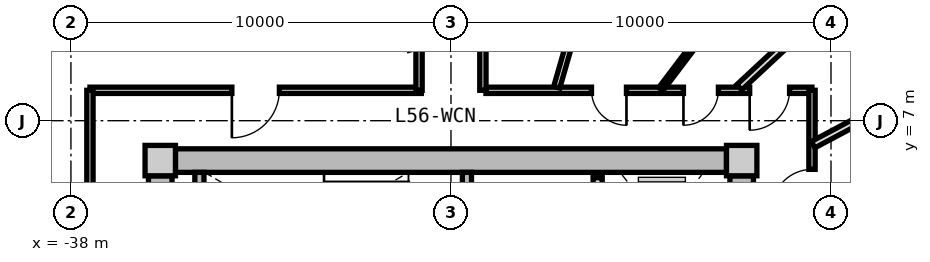
"""IFC4 building model, lengths in metres.
Left out: names, types, materials, properties, quantities, classifications, styles, units other than length and angle.
Written with IfcOpenShell. Run it as: python <this file> out.ifc"""

import sys

from ifc_helpers import new_model, si_unit, direction, frame, frame_2d, origin, origin_2d, place, context, subcontext, project, spatial, rectangle, extrude, source, transform, mapped, element, fill, save


model = new_model("IFC4")
c1 = context("Model", 3, precision=1e-05, world=origin(), true_north=direction((0.0, 1.0)))
c2 = subcontext(c1, "Body", "Model", "MODEL_VIEW")
j1 = project(units=[si_unit("LENGTHUNIT", "METRE"), si_unit("PLANEANGLEUNIT", "RADIAN")], contexts=[c1])
p1 = place(None, origin())
s1 = spatial("IfcSite", under=j1, at=p1, CompositionType="ELEMENT")
p2 = place(p1, origin())
s2 = spatial("IfcBuilding", under=s1, at=p2, CompositionType="ELEMENT")
p3 = place(p2, frame((0.0, 0.0, 180.05)))
s3 = spatial("IfcBuildingStorey", under=s2, at=p3, CompositionType="ELEMENT", Elevation=180.05)
m1 = source(origin(), c2, "Body", "SweptSolid", [
    extrude(rectangle(XDim=0.8, YDim=0.8, at=origin_2d()), origin(), (0.0, 0.0, 1.0), 3.05),
])
for number, where, z_axis, x_axis in (
    (1, (-20.35, 5.95, 0.0), (0.0, 0.0, 1.0), (1.0, 0.0, 0.0)),
    (2, (-35.65, 5.95, 0.0), (0.0, 0.0, 1.0), (1.0, 0.0, 0.0)),
):
    element("IfcColumn", number, at=place(p3, frame(where, z_axis=z_axis, x_axis=x_axis)), inside=s3, PredefinedType="COLUMN", context=c2, shape_type="MappedRepresentation", body=[
        mapped(m1, transform((0.0, 0.0, 0.0), x_axis=(1.0, 0.0, 0.0), y_axis=(0.0, 1.0, 0.0), z_axis=(0.0, 0.0, 1.0), scale=1.0)),
    ])
m2 = source(origin(), c2, "Body", "SweptSolid", [
    extrude(rectangle(XDim=14.5, YDim=0.62, at=frame_2d((7.25, 0.0))), origin(), (0.0, 0.0, 1.0), 2.81),
])
p4 = place(p3, frame((-35.25, 5.95, 0.0), z_axis=(0.0, 0.0, 1.0), x_axis=(1.0, 0.0, 0.0)))
e3 = element("IfcWall", 3, at=p4, inside=s3, PredefinedType="SHEAR", context=c2, shape_type="MappedRepresentation", body=[
    mapped(m2, transform((0.0, 0.0, 0.0), x_axis=(1.0, 0.0, 0.0), y_axis=(0.0, 1.0, 0.0), z_axis=(0.0, 0.0, 1.0), scale=1.0)),
])
m3 = source(origin(), c2, "Body", "SweptSolid", [
    extrude(rectangle(XDim=11.1, YDim=0.62, at=frame_2d((5.55, 0.0))), origin(), (0.0, 0.0, 1.0), 2.81),
])
p5 = place(p3, frame((-35.65, -5.55, 0.0), z_axis=(0.0, 0.0, 1.0), x_axis=(0.0, 1.0, 0.0)))
e4 = element("IfcWall", 4, at=p5, inside=s3, PredefinedType="SHEAR", context=c2, shape_type="MappedRepresentation", body=[
    mapped(m3, transform((0.0, 0.0, 0.0), x_axis=(1.0, 0.0, 0.0), y_axis=(0.0, 1.0, 0.0), z_axis=(0.0, 0.0, 1.0), scale=1.0)),
])
p6 = place(p5, frame((3.8, 0.0, 0.0)))
e5 = element("IfcOpeningElement", 5, at=p6, cuts=e4, PredefinedType="OPENING", context=c2, shape_type="SweptSolid", body=[
    extrude(rectangle(XDim=1.2, YDim=2.15, at=frame_2d((0.6, 1.075))), frame((0.0, 0.32, 0.0), z_axis=(0.0, -1.0, 0.0), x_axis=(1.0, 0.0, 0.0)), (0.0, 0.0, 1.0), 0.64),
])
p7 = place(p3, frame((-20.35, 5.55, 0.0), z_axis=(0.0, 0.0, 1.0), x_axis=(0.0, -1.0, 0.0)))
e6 = element("IfcWall", 6, at=p7, inside=s3, PredefinedType="SHEAR", context=c2, shape_type="MappedRepresentation", body=[
    mapped(m3, transform((0.0, 0.0, 0.0), x_axis=(1.0, 0.0, 0.0), y_axis=(0.0, 1.0, 0.0), z_axis=(0.0, 0.0, 1.0), scale=1.0)),
])
p8 = place(p7, frame((5.65, 0.0, 0.0)))
e7 = element("IfcOpeningElement", 7, at=p8, cuts=e6, PredefinedType="OPENING", context=c2, shape_type="SweptSolid", body=[
    extrude(rectangle(XDim=1.2, YDim=2.15, at=frame_2d((0.6, 1.075))), frame((0.0, 0.32, 0.0), z_axis=(0.0, -1.0, 0.0), x_axis=(1.0, 0.0, 0.0)), (0.0, 0.0, 1.0), 0.64),
])
m4 = source(origin(), c2, "Body", "SweptSolid", [
    extrude(rectangle(XDim=3.19, YDim=0.24, at=frame_2d((1.595, 0.0))), origin(), (0.0, 0.0, 1.0), 2.81),
])
p9 = place(p3, frame((-34.62, 2.45, 0.0), z_axis=(0.0, 0.0, 1.0), x_axis=(0.0, 1.0, 0.0)))
e8 = element("IfcWall", 8, at=p9, inside=s3, PredefinedType="PARTITIONING", context=c2, shape_type="MappedRepresentation", body=[
    mapped(m4, transform((0.0, 0.0, 0.0), x_axis=(1.0, 0.0, 0.0), y_axis=(0.0, 1.0, 0.0), z_axis=(0.0, 0.0, 1.0), scale=1.0)),
])
p10 = place(p3, frame((-27.58, 2.45, 0.0), z_axis=(0.0, 0.0, 1.0), x_axis=(0.0, 1.0, 0.0)))
e9 = element("IfcWall", 9, at=p10, inside=s3, PredefinedType="PARTITIONING", context=c2, shape_type="MappedRepresentation", body=[
    mapped(m4, transform((0.0, 0.0, 0.0), x_axis=(1.0, 0.0, 0.0), y_axis=(0.0, 1.0, 0.0), z_axis=(0.0, 0.0, 1.0), scale=1.0)),
])
p11 = place(p10, frame((0.55, 0.0, 0.0)))
e10 = element("IfcOpeningElement", 10, at=p11, cuts=e9, PredefinedType="OPENING", context=c2, shape_type="SweptSolid", body=[
    extrude(rectangle(XDim=1.1, YDim=2.15, at=frame_2d((0.55, 1.075))), frame((0.0, 0.13, 0.0), z_axis=(0.0, -1.0, 0.0), x_axis=(1.0, 0.0, 0.0)), (0.0, 0.0, 1.0), 0.26),
])
m5 = source(origin(), c2, "Body", "SweptSolid", [
    extrude(rectangle(XDim=5.0, YDim=0.24, at=frame_2d((2.5, 0.0))), origin(), (0.0, 0.0, 1.0), 2.795),
])
p12 = place(p3, frame((-24.14, 0.5, 0.0), z_axis=(0.0, 0.0, 1.0), x_axis=(0.0, 1.0, 0.0)))
e11 = element("IfcWall", 11, at=p12, inside=s3, PredefinedType="PARTITIONING", context=c2, shape_type="MappedRepresentation", body=[
    mapped(m5, transform((0.0, 0.0, 0.0), x_axis=(1.0, 0.0, 0.0), y_axis=(0.0, 1.0, 0.0), z_axis=(0.0, 0.0, 1.0), scale=1.0)),
])
p13 = place(p12, frame((3.05, 0.0, 0.0)))
e12 = element("IfcOpeningElement", 12, at=p13, cuts=e11, PredefinedType="OPENING", context=c2, shape_type="SweptSolid", body=[
    extrude(rectangle(XDim=1.3, YDim=2.2, at=frame_2d((0.65, 1.1))), frame((0.0, 0.13, 0.0), z_axis=(0.0, -1.0, 0.0), x_axis=(1.0, 0.0, 0.0)), (0.0, 0.0, 1.0), 0.26),
])
p14 = place(p12, frame((0.55, 0.0, 0.0)))
e13 = element("IfcOpeningElement", 13, at=p14, cuts=e11, PredefinedType="OPENING", context=c2, shape_type="SweptSolid", body=[
    extrude(rectangle(XDim=1.3, YDim=2.2, at=frame_2d((0.65, 1.1))), frame((0.0, 0.13, 0.0), z_axis=(0.0, -1.0, 0.0), x_axis=(1.0, 0.0, 0.0)), (0.0, 0.0, 1.0), 0.26),
])
m6 = source(origin(), c2, "Body", "SweptSolid", [
    extrude(rectangle(XDim=8.719, YDim=0.165, at=frame_2d((4.36, 0.0))), origin(), (0.0, 0.0, 1.0), 2.795),
])
p15 = place(p3, frame((-37.5, 7.8, 0.0), z_axis=(0.0, 0.0, 1.0), x_axis=(1.0, 0.0, 0.0)))
e14 = element("IfcWall", 14, at=p15, inside=s3, PredefinedType="PARTITIONING", context=c2, shape_type="MappedRepresentation", body=[
    mapped(m6, transform((0.0, 0.0, 0.0), x_axis=(1.0, 0.0, 0.0), y_axis=(0.0, 1.0, 0.0), z_axis=(0.0, 0.0, 1.0), scale=1.0)),
])
p16 = place(p15, frame((3.735, 0.0, 0.0)))
e15 = element("IfcOpeningElement", 15, at=p16, cuts=e14, PredefinedType="OPENING", context=c2, shape_type="SweptSolid", body=[
    extrude(rectangle(XDim=1.25, YDim=2.2, at=frame_2d((0.625, 1.1))), frame((0.0, 0.093, 0.0), z_axis=(0.0, -1.0, 0.0), x_axis=(1.0, 0.0, 0.0)), (0.0, 0.0, 1.0), 0.185),
])
m7 = source(origin(), c2, "Body", "SweptSolid", [
    extrude(rectangle(XDim=8.58, YDim=0.165, at=frame_2d((4.29, 0.0))), origin(), (0.0, 0.0, 1.0), 2.795),
])
p17 = place(p3, frame((-27.08, 7.8, 0.0), z_axis=(0.0, 0.0, 1.0), x_axis=(1.0, 0.0, 0.0)))
e16 = element("IfcWall", 16, at=p17, inside=s3, PredefinedType="PARTITIONING", context=c2, shape_type="MappedRepresentation", body=[
    mapped(m7, transform((0.0, 0.0, 0.0), x_axis=(1.0, 0.0, 0.0), y_axis=(0.0, 1.0, 0.0), z_axis=(0.0, 0.0, 1.0), scale=1.0)),
])
p18 = place(p17, frame((6.94, 0.0, 0.0)))
e17 = element("IfcOpeningElement", 17, at=p18, cuts=e16, PredefinedType="OPENING", context=c2, shape_type="SweptSolid", body=[
    extrude(rectangle(XDim=1.05, YDim=2.15, at=frame_2d((0.525, 1.075))), frame((0.0, 0.093, 0.0), z_axis=(0.0, -1.0, 0.0), x_axis=(1.0, 0.0, 0.0)), (0.0, 0.0, 1.0), 0.185),
])
p19 = place(p17, frame((5.197, 0.0, 0.0)))
e18 = element("IfcOpeningElement", 18, at=p19, cuts=e16, PredefinedType="OPENING", context=c2, shape_type="SweptSolid", body=[
    extrude(rectangle(XDim=0.92, YDim=2.1, at=frame_2d((0.46, 1.05))), frame((0.0, 0.093, 0.0), z_axis=(0.0, -1.0, 0.0), x_axis=(1.0, 0.0, 0.0)), (0.0, 0.0, 1.0), 0.185),
])
p20 = place(p17, frame((2.778, 0.0, 0.0)))
e19 = element("IfcOpeningElement", 19, at=p20, cuts=e16, PredefinedType="OPENING", context=c2, shape_type="SweptSolid", body=[
    extrude(rectangle(XDim=0.92, YDim=2.1, at=frame_2d((0.46, 1.05))), frame((0.0, 0.093, 0.0), z_axis=(0.0, -1.0, 0.0), x_axis=(1.0, 0.0, 0.0)), (0.0, 0.0, 1.0), 0.185),
])
m8 = source(origin(), c2, "Body", "SweptSolid", [
    extrude(rectangle(XDim=6.88, YDim=0.165, at=frame_2d((3.44, 0.0))), origin(), (0.0, 0.0, 1.0), 2.795),
])
p21 = place(p3, frame((-37.5, 0.92, 0.0), z_axis=(0.0, 0.0, 1.0), x_axis=(0.0, 1.0, 0.0)))
e20 = element("IfcWall", 20, at=p21, inside=s3, PredefinedType="PARTITIONING", context=c2, shape_type="MappedRepresentation", body=[
    mapped(m8, transform((0.0, 0.0, 0.0), x_axis=(1.0, 0.0, 0.0), y_axis=(0.0, 1.0, 0.0), z_axis=(0.0, 0.0, 1.0), scale=1.0)),
])
p22 = place(p3, frame((-18.5, 7.8, 0.0), z_axis=(0.0, 0.0, 1.0), x_axis=(0.0, -1.0, 0.0)))
e21 = element("IfcWall", 21, at=p22, inside=s3, PredefinedType="PARTITIONING", context=c2, shape_type="MappedRepresentation", body=[
    mapped(m8, transform((0.0, 0.0, 0.0), x_axis=(1.0, 0.0, 0.0), y_axis=(0.0, 1.0, 0.0), z_axis=(0.0, 0.0, 1.0), scale=1.0)),
])
p23 = place(p22, frame((2.081, 0.0, 0.0)))
e22 = element("IfcOpeningElement", 22, at=p23, cuts=e21, PredefinedType="OPENING", context=c2, shape_type="SweptSolid", body=[
    extrude(rectangle(XDim=1.05, YDim=2.15, at=frame_2d((0.525, 1.075))), frame((0.0, 0.093, 0.0), z_axis=(0.0, -1.0, 0.0), x_axis=(1.0, 0.0, 0.0)), (0.0, 0.0, 1.0), 0.185),
])
m9 = source(origin(), c2, "Body", "SweptSolid", [
    extrude(rectangle(XDim=9.73, YDim=0.165, at=frame_2d((4.865, 0.0))), origin(), (0.0, 0.0, 1.0), 2.345),
])
p24 = place(p3, frame((-25.217, 7.88, 0.0), z_axis=(0.0, 0.0, 1.0), x_axis=(0.27679492614, 0.960929013436, 0.0)))
e23 = element("IfcWall", 23, at=p24, inside=s3, PredefinedType="PARTITIONING", context=c2, shape_type="MappedRepresentation", body=[
    mapped(m9, transform((0.0, 0.0, 0.0), x_axis=(1.0, 0.0, 0.0), y_axis=(0.0, 1.0, 0.0), z_axis=(0.0, 0.0, 1.0), scale=1.0)),
])
m10 = source(origin(), c2, "Body", "SweptSolid", [
    extrude(rectangle(XDim=6.193, YDim=0.165, at=frame_2d((3.096, 0.0))), origin(), (0.0, 0.0, 1.0), 2.345),
])
p25 = place(p3, frame((-37.58, 4.419, 0.0), z_axis=(0.0, 0.0, 1.0), x_axis=(-0.970309243466, 0.241867674657, 0.0)))
e24 = element("IfcWall", 24, at=p25, inside=s3, PredefinedType="PARTITIONING", context=c2, shape_type="MappedRepresentation", body=[
    mapped(m10, transform((0.0, 0.0, 0.0), x_axis=(1.0, 0.0, 0.0), y_axis=(0.0, 1.0, 0.0), z_axis=(0.0, 0.0, 1.0), scale=1.0)),
])
m11 = source(origin(), c2, "Body", "SweptSolid", [
    extrude(rectangle(XDim=8.305, YDim=0.165, at=frame_2d((4.153, 0.0))), origin(), (0.0, 0.0, 1.0), 2.345),
])
p26 = place(p3, frame((-18.42, 3.908, 0.0), z_axis=(0.0, 0.0, 1.0), x_axis=(0.970309994378, 0.241864662175, 0.0)))
e25 = element("IfcWall", 25, at=p26, inside=s3, PredefinedType="PARTITIONING", context=c2, shape_type="MappedRepresentation", body=[
    mapped(m11, transform((0.0, 0.0, 0.0), x_axis=(1.0, 0.0, 0.0), y_axis=(0.0, 1.0, 0.0), z_axis=(0.0, 0.0, 1.0), scale=1.0)),
])
m12 = source(origin(), c2, "Body", "SweptSolid", [
    extrude(rectangle(XDim=9.48, YDim=0.165, at=frame_2d((4.74, 0.0))), origin(), (0.0, 0.0, 1.0), 2.795),
])
p27 = place(p3, frame((-28.84, 7.8, 0.0), z_axis=(0.0, 0.0, 1.0), x_axis=(0.0, 1.0, 0.0)))
e26 = element("IfcWall", 26, at=p27, inside=s3, PredefinedType="PARTITIONING", context=c2, shape_type="MappedRepresentation", body=[
    mapped(m12, transform((0.0, 0.0, 0.0), x_axis=(1.0, 0.0, 0.0), y_axis=(0.0, 1.0, 0.0), z_axis=(0.0, 0.0, 1.0), scale=1.0)),
])
p28 = place(p27, frame((4.521, 0.0, 0.0)))
e27 = element("IfcOpeningElement", 27, at=p28, cuts=e26, PredefinedType="OPENING", context=c2, shape_type="SweptSolid", body=[
    extrude(rectangle(XDim=0.95, YDim=2.1, at=frame_2d((0.475, 1.05))), frame((0.0, 0.093, 0.0), z_axis=(0.0, -1.0, 0.0), x_axis=(1.0, 0.0, 0.0)), (0.0, 0.0, 1.0), 0.185),
])
p29 = place(p3, frame((-27.16, 17.28, 0.0), z_axis=(0.0, 0.0, 1.0), x_axis=(0.0, -1.0, 0.0)))
e28 = element("IfcWall", 28, at=p29, inside=s3, PredefinedType="PARTITIONING", context=c2, shape_type="MappedRepresentation", body=[
    mapped(m12, transform((0.0, 0.0, 0.0), x_axis=(1.0, 0.0, 0.0), y_axis=(0.0, 1.0, 0.0), z_axis=(0.0, 0.0, 1.0), scale=1.0)),
])
p30 = place(p29, frame((4.265, 0.0, 0.0)))
e29 = element("IfcOpeningElement", 29, at=p30, cuts=e28, PredefinedType="OPENING", context=c2, shape_type="SweptSolid", body=[
    extrude(rectangle(XDim=0.95, YDim=2.1, at=frame_2d((0.475, 1.05))), frame((0.0, 0.093, 0.0), z_axis=(0.0, -1.0, 0.0), x_axis=(1.0, 0.0, 0.0)), (0.0, 0.0, 1.0), 0.185),
])
m13 = source(origin(), c2, "Body", "SweptSolid", [
    extrude(rectangle(XDim=7.648, YDim=0.19, at=frame_2d((3.824, 0.0))), origin(), (0.0, 0.0, 1.0), 2.345),
])
p31 = place(p3, frame((-20.413, 7.88, 0.0), z_axis=(0.0, 0.0, 1.0), x_axis=(0.732182665826, 0.681108320213, 0.0)))
e30 = element("IfcWall", 30, at=p31, inside=s3, PredefinedType="PARTITIONING", context=c2, shape_type="MappedRepresentation", body=[
    mapped(m13, transform((0.0, 0.0, 0.0), x_axis=(1.0, 0.0, 0.0), y_axis=(0.0, 1.0, 0.0), z_axis=(0.0, 0.0, 1.0), scale=1.0)),
])
m14 = source(origin(), c2, "Body", "SweptSolid", [
    extrude(rectangle(XDim=6.665, YDim=0.19, at=frame_2d((3.333, 0.0))), origin(), (0.0, 0.0, 1.0), 2.795),
])
p32 = place(p3, frame((-18.47, 6.37, 0.0), z_axis=(0.0, 0.0, 1.0), x_axis=(0.88263769619, 0.470053930166, 0.0)))
e31 = element("IfcWall", 31, at=p32, inside=s3, PredefinedType="PARTITIONING", context=c2, shape_type="MappedRepresentation", body=[
    mapped(m14, transform((0.0, 0.0, 0.0), x_axis=(1.0, 0.0, 0.0), y_axis=(0.0, 1.0, 0.0), z_axis=(0.0, 0.0, 1.0), scale=1.0)),
])
m15 = source(origin(), c2, "Body", "SweptSolid", [
    extrude(rectangle(XDim=8.359, YDim=0.14, at=frame_2d((4.18, 0.0))), origin(), (0.0, 0.0, 1.0), 2.795),
])
p33 = place(p3, frame((-22.477, 7.83, 0.0), z_axis=(0.0, 0.0, 1.0), x_axis=(0.603265985309, 0.797540062297, 0.0)))
e32 = element("IfcWall", 32, at=p33, inside=s3, PredefinedType="PARTITIONING", context=c2, shape_type="MappedRepresentation", body=[
    mapped(m15, transform((0.0, 0.0, 0.0), x_axis=(1.0, 0.0, 0.0), y_axis=(0.0, 1.0, 0.0), z_axis=(0.0, 0.0, 1.0), scale=1.0)),
])
m16 = source(origin(), c2, "Body", "SweptSolid", [
    extrude(rectangle(XDim=1.05, YDim=2.15, at=frame_2d((0.525, 1.075))), frame((0.0, 0.025, 0.0), z_axis=(0.0, -1.0, 0.0), x_axis=(1.0, 0.0, 0.0)), (0.0, 0.0, 1.0), 0.05),
])
p34 = place(p23, frame((1.05, 0.0, 0.0), z_axis=(0.0, 0.0, 1.0), x_axis=(-1.0, 0.0, 0.0)))
e33 = element("IfcDoor", 33, at=p34, inside=s3, OperationType="SINGLE_SWING_LEFT", PredefinedType="DOOR", context=c2, shape_type="MappedRepresentation", body=[
    mapped(m16, transform((0.0, 0.0, 0.0), x_axis=(1.0, 0.0, 0.0), y_axis=(0.0, 1.0, 0.0), z_axis=(0.0, 0.0, 1.0), scale=1.0)),
])
fill(e22, e33)
p35 = place(p18, frame((1.05, 0.0, 0.0), z_axis=(0.0, 0.0, 1.0), x_axis=(-1.0, 0.0, 0.0)))
e34 = element("IfcDoor", 34, at=p35, inside=s3, OperationType="SINGLE_SWING_RIGHT", PredefinedType="DOOR", context=c2, shape_type="MappedRepresentation", body=[
    mapped(m16, transform((0.0, 0.0, 0.0), x_axis=(1.0, 0.0, 0.0), y_axis=(0.0, 1.0, 0.0), z_axis=(0.0, 0.0, 1.0), scale=1.0)),
])
fill(e17, e34)
m17 = source(origin(), c2, "Body", "SweptSolid", [
    extrude(rectangle(XDim=0.92, YDim=2.1, at=frame_2d((0.46, 1.05))), frame((0.0, 0.025, 0.0), z_axis=(0.0, -1.0, 0.0), x_axis=(1.0, 0.0, 0.0)), (0.0, 0.0, 1.0), 0.05),
])
p36 = place(p19, frame((0.92, 0.0, 0.0), z_axis=(0.0, 0.0, 1.0), x_axis=(-1.0, 0.0, 0.0)))
e35 = element("IfcDoor", 35, at=p36, inside=s3, OperationType="SINGLE_SWING_RIGHT", PredefinedType="DOOR", context=c2, shape_type="MappedRepresentation", body=[
    mapped(m17, transform((0.0, 0.0, 0.0), x_axis=(1.0, 0.0, 0.0), y_axis=(0.0, 1.0, 0.0), z_axis=(0.0, 0.0, 1.0), scale=1.0)),
])
fill(e18, e35)
p37 = place(p20, frame((0.92, 0.0, 0.0), z_axis=(0.0, 0.0, 1.0), x_axis=(-1.0, 0.0, 0.0)))
e36 = element("IfcDoor", 36, at=p37, inside=s3, OperationType="SINGLE_SWING_LEFT", PredefinedType="DOOR", context=c2, shape_type="MappedRepresentation", body=[
    mapped(m17, transform((0.0, 0.0, 0.0), x_axis=(1.0, 0.0, 0.0), y_axis=(0.0, 1.0, 0.0), z_axis=(0.0, 0.0, 1.0), scale=1.0)),
])
fill(e19, e36)
m18 = source(origin(), c2, "Body", "SweptSolid", [
    extrude(rectangle(XDim=1.25, YDim=2.2, at=frame_2d((0.625, 1.1))), frame((0.0, 0.025, 0.0), z_axis=(0.0, -1.0, 0.0), x_axis=(1.0, 0.0, 0.0)), (0.0, 0.0, 1.0), 0.05),
])
p38 = place(p16, frame((1.25, 0.0, 0.0), z_axis=(0.0, 0.0, 1.0), x_axis=(-1.0, 0.0, 0.0)))
e37 = element("IfcDoor", 37, at=p38, inside=s3, OperationType="SINGLE_SWING_RIGHT", PredefinedType="DOOR", context=c2, shape_type="MappedRepresentation", body=[
    mapped(m18, transform((0.0, 0.0, 0.0), x_axis=(1.0, 0.0, 0.0), y_axis=(0.0, 1.0, 0.0), z_axis=(0.0, 0.0, 1.0), scale=1.0)),
])
fill(e15, e37)
save(model, sys.argv[1])
